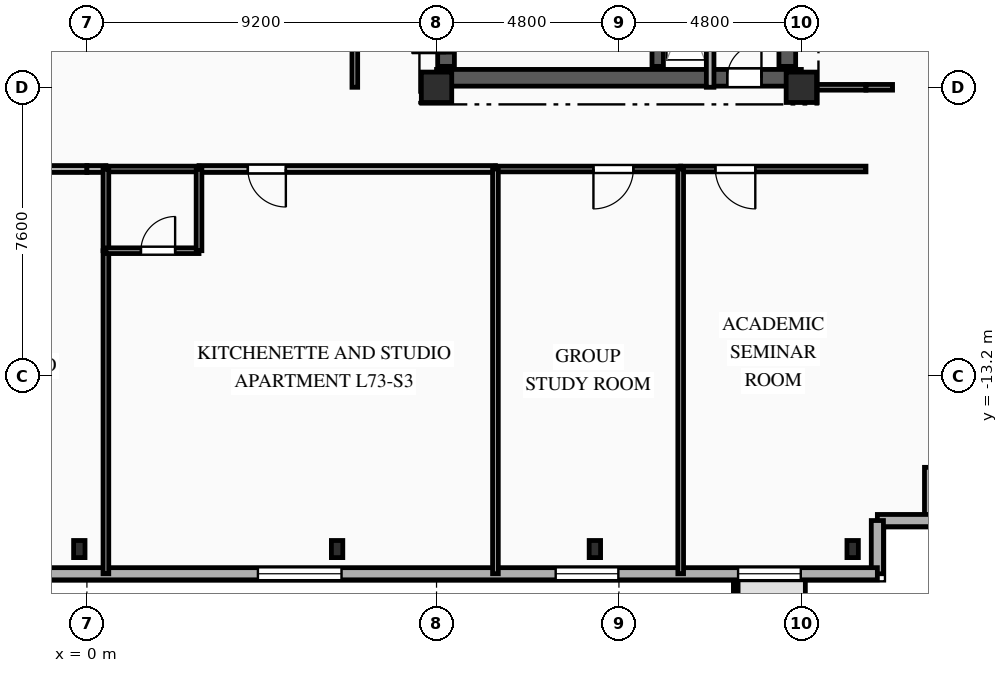
"""IFC4 building model, lengths in metres.
Left out: names, types, materials, properties, quantities, classifications, styles, units other than length and angle.
Written with IfcOpenShell. Run it as: python <this file> out.ifc"""

import sys

from ifc_helpers import new_model, si_unit, direction, frame, frame_2d, origin, origin_2d, place, context, subcontext, project, spatial, rectangle, i_section, extrude, element, fill, save


model = new_model("IFC4")
c1 = context("Model", 3, precision=1e-05, world=origin(), true_north=direction((0.0, 1.0)))
c2 = subcontext(c1, "Body", "Model", "MODEL_VIEW")
j1 = project(units=[si_unit("LENGTHUNIT", "METRE"), si_unit("PLANEANGLEUNIT", "RADIAN")], contexts=[c1])
p1 = place(None, origin())
s1 = spatial("IfcSite", under=j1, at=p1, CompositionType="ELEMENT")
p2 = place(p1, origin())
s2 = spatial("IfcBuilding", under=s1, at=p2, CompositionType="ELEMENT")
p3 = place(p2, frame((0.0, 0.0, 258.45)))
s3 = spatial("IfcBuildingStorey", under=s2, at=p3, CompositionType="ELEMENT", Elevation=258.45)
for number, where, z_axis, x_axis in (
    (1, (9.2, -5.6, 0.0), (0.0, 0.0, 1.0), (1.0, 0.0, 0.0)),
    (2, (18.8, -5.6, 0.0), (0.0, 0.0, 1.0), (1.0, 0.0, 0.0)),
):
    element("IfcColumn", number, at=place(p3, frame(where, z_axis=z_axis, x_axis=x_axis)), inside=s3, PredefinedType="COLUMN", context=c2, shape_type="SweptSolid", body=[
        extrude(rectangle(XDim=0.8, YDim=0.8, at=origin_2d()), origin(), (0.0, 0.0, 1.0), 3.35),
    ])
for number, where, z_axis, x_axis in (
    (3, (-0.2, -17.75, 0.0), (0.0, 0.0, 1.0), (1.0, 0.0, 0.0)),
    (4, (6.583, -17.75, 0.0), (0.0, 0.0, 1.0), (1.0, 0.0, 0.0)),
    (5, (13.367, -17.75, 0.0), (0.0, 0.0, 1.0), (1.0, 0.0, 0.0)),
    (6, (20.15, -17.75, 0.0), (0.0, 0.0, 1.0), (1.0, 0.0, 0.0)),
):
    element("IfcColumn", number, at=place(p3, frame(where, z_axis=z_axis, x_axis=x_axis)), inside=s3, PredefinedType="COLUMN", context=c2, shape_type="SweptSolid", body=[
        extrude(i_section(OverallWidth=0.3, OverallDepth=0.45, WebThickness=0.014, FlangeThickness=0.026, FilletRadius=0.027, at=origin_2d()), origin(), (0.0, 0.0, 1.0), 3.35),
    ])
for number, where, z_axis, x_axis in (
    (7, (22.2, -15.6, 0.0), (0.0, 0.0, 1.0), (0.0, -1.0, 0.0)),
    (8, (22.2, -17.0, 0.0), (0.0, 0.0, 1.0), (-1.0, 0.0, 0.0)),
    (9, (20.8, -17.0, 0.0), (0.0, 0.0, 1.0), (0.0, -1.0, 0.0)),
):
    element("IfcWall", number, at=place(p3, frame(where, z_axis=z_axis, x_axis=x_axis)), inside=s3, PredefinedType="SOLIDWALL", context=c2, shape_type="SweptSolid", body=[
        extrude(rectangle(XDim=1.4, YDim=0.32, at=frame_2d((0.7, 0.0))), origin(), (0.0, 0.0, 1.0), 3.03),
    ])
p4 = place(p3, frame((20.8, -18.4, 0.0), z_axis=(0.0, 0.0, 1.0), x_axis=(-1.0, 0.0, 0.0)))
e10 = element("IfcWall", 10, at=p4, inside=s3, PredefinedType="SOLIDWALL", context=c2, shape_type="SweptSolid", body=[
    extrude(rectangle(XDim=42.0, YDim=0.32, at=frame_2d((21.0, 0.0))), origin(), (0.0, 0.0, 1.0), 3.03),
])
p5 = place(p4, frame((2.015, 0.0, 0.85)))
e11 = element("IfcOpeningElement", 11, at=p5, cuts=e10, PredefinedType="OPENING", context=c2, shape_type="SweptSolid", body=[
    extrude(rectangle(XDim=1.65, YDim=1.85, at=frame_2d((0.825, 0.925))), frame((0.0, 0.17, 0.0), z_axis=(0.0, -1.0, 0.0), x_axis=(1.0, 0.0, 0.0)), (0.0, 0.0, 1.0), 0.34),
])
p6 = place(p4, frame((6.815, 0.0, 0.85)))
e12 = element("IfcOpeningElement", 12, at=p6, cuts=e10, PredefinedType="OPENING", context=c2, shape_type="SweptSolid", body=[
    extrude(rectangle(XDim=1.65, YDim=1.85, at=frame_2d((0.825, 0.925))), frame((0.0, 0.17, 0.0), z_axis=(0.0, -1.0, 0.0), x_axis=(1.0, 0.0, 0.0)), (0.0, 0.0, 1.0), 0.34),
])
p7 = place(p4, frame((14.1, 0.0, 0.85)))
e13 = element("IfcOpeningElement", 13, at=p7, cuts=e10, PredefinedType="OPENING", context=c2, shape_type="SweptSolid", body=[
    extrude(rectangle(XDim=2.2, YDim=1.85, at=frame_2d((1.1, 0.925))), frame((0.0, 0.17, 0.0), z_axis=(0.0, -1.0, 0.0), x_axis=(1.0, 0.0, 0.0)), (0.0, 0.0, 1.0), 0.34),
])
p8 = place(p4, frame((24.34, 0.0, 0.85)))
e14 = element("IfcOpeningElement", 14, at=p8, cuts=e10, PredefinedType="OPENING", context=c2, shape_type="SweptSolid", body=[
    extrude(rectangle(XDim=2.2, YDim=1.85, at=frame_2d((1.1, 0.925))), frame((0.0, 0.17, 0.0), z_axis=(0.0, -1.0, 0.0), x_axis=(1.0, 0.0, 0.0)), (0.0, 0.0, 1.0), 0.34),
])
p9 = place(p4, frame((32.455, 0.0, 0.85)))
e15 = element("IfcOpeningElement", 15, at=p9, cuts=e10, PredefinedType="OPENING", context=c2, shape_type="SweptSolid", body=[
    extrude(rectangle(XDim=1.65, YDim=1.85, at=frame_2d((0.825, 0.925))), frame((0.0, 0.17, 0.0), z_axis=(0.0, -1.0, 0.0), x_axis=(1.0, 0.0, 0.0)), (0.0, 0.0, 1.0), 0.34),
])
p10 = place(p4, frame((37.855, 0.0, 0.85)))
e16 = element("IfcOpeningElement", 16, at=p10, cuts=e10, PredefinedType="OPENING", context=c2, shape_type="SweptSolid", body=[
    extrude(rectangle(XDim=1.65, YDim=1.85, at=frame_2d((0.825, 0.925))), frame((0.0, 0.17, 0.0), z_axis=(0.0, -1.0, 0.0), x_axis=(1.0, 0.0, 0.0)), (0.0, 0.0, 1.0), 0.34),
])
p11 = place(p3, frame((9.2, -5.35, 0.0), z_axis=(0.0, 0.0, 1.0), x_axis=(1.0, 0.0, 0.0)))
e17 = element("IfcWall", 17, at=p11, inside=s3, PredefinedType="SHEAR", context=c2, shape_type="SweptSolid", body=[
    extrude(rectangle(XDim=9.6, YDim=0.44, at=frame_2d((4.8, 0.0))), origin(), (0.0, 0.0, 1.0), 3.03),
])
p12 = place(p11, frame((7.65, 0.0, 0.0)))
e18 = element("IfcOpeningElement", 18, at=p12, cuts=e17, PredefinedType="OPENING", context=c2, shape_type="SweptSolid", body=[
    extrude(rectangle(XDim=0.9, YDim=2.1, at=frame_2d((0.45, 1.05))), frame((0.0, 0.23, 0.0), z_axis=(0.0, -1.0, 0.0), x_axis=(1.0, 0.0, 0.0)), (0.0, 0.0, 1.0), 0.46),
])
p13 = place(p3, frame((9.45, -5.05, 0.0), z_axis=(0.0, 0.0, 1.0), x_axis=(0.0, 1.0, 0.0)))
e19 = element("IfcWall", 19, at=p13, inside=s3, PredefinedType="SHEAR", context=c2, shape_type="SweptSolid", body=[
    extrude(rectangle(XDim=10.1, YDim=0.44, at=frame_2d((5.05, 0.0))), origin(), (0.0, 0.0, 1.0), 3.03),
])
p14 = place(p13, frame((7.15, 0.0, 0.0)))
e20 = element("IfcOpeningElement", 20, at=p14, cuts=e19, PredefinedType="OPENING", context=c2, shape_type="SweptSolid", body=[
    extrude(rectangle(XDim=0.9, YDim=2.1, at=frame_2d((0.45, 1.05))), frame((0.0, 0.23, 0.0), z_axis=(0.0, -1.0, 0.0), x_axis=(1.0, 0.0, 0.0)), (0.0, 0.0, 1.0), 0.46),
])
p15 = place(p13, frame((2.4, 0.0, 0.0)))
e21 = element("IfcOpeningElement", 21, at=p15, cuts=e19, PredefinedType="OPENING", context=c2, shape_type="SweptSolid", body=[
    extrude(rectangle(XDim=1.2, YDim=2.15, at=frame_2d((0.6, 1.075))), frame((0.0, 0.23, 0.0), z_axis=(0.0, -1.0, 0.0), x_axis=(1.0, 0.0, 0.0)), (0.0, 0.0, 1.0), 0.46),
])
p16 = place(p13, frame((0.35, 0.0, 0.0)))
e22 = element("IfcOpeningElement", 22, at=p16, cuts=e19, PredefinedType="OPENING", context=c2, shape_type="SweptSolid", body=[
    extrude(rectangle(XDim=0.9, YDim=2.1, at=frame_2d((0.45, 1.05))), frame((0.0, 0.23, 0.0), z_axis=(0.0, -1.0, 0.0), x_axis=(1.0, 0.0, 0.0)), (0.0, 0.0, 1.0), 0.46),
])
p17 = place(p3, frame((18.43, -5.05, 0.0), z_axis=(0.0, 0.0, 1.0), x_axis=(0.0, 1.0, 0.0)))
e23 = element("IfcWall", 23, at=p17, inside=s3, PredefinedType="SHEAR", context=c2, shape_type="SweptSolid", body=[
    extrude(rectangle(XDim=10.1, YDim=0.44, at=frame_2d((5.05, 0.0))), origin(), (0.0, 0.0, 1.0), 3.03),
])
p18 = place(p3, frame((15.02, -5.05, 0.0), z_axis=(0.0, 0.0, 1.0), x_axis=(0.0, 1.0, 0.0)))
e24 = element("IfcWall", 24, at=p18, inside=s3, PredefinedType="SHEAR", context=c2, shape_type="SweptSolid", body=[
    extrude(rectangle(XDim=10.1, YDim=0.3, at=frame_2d((5.05, 0.0))), origin(), (0.0, 0.0, 1.0), 3.03),
])
p19 = place(p3, frame((16.4, -2.11, 0.0), z_axis=(0.0, 0.0, 1.0), x_axis=(0.0, -1.0, 0.0)))
e25 = element("IfcWall", 25, at=p19, inside=s3, PredefinedType="PARTITIONING", context=c2, shape_type="SweptSolid", body=[
    extrude(rectangle(XDim=3.49, YDim=0.2, at=frame_2d((1.745, 0.0))), origin(), (0.0, 0.0, 1.0), 3.03),
])
p20 = place(p3, frame((0.0, -7.75, 0.0), z_axis=(0.0, 0.0, 1.0), x_axis=(-1.0, 0.0, 0.0)))
e26 = element("IfcWall", 26, at=p20, inside=s3, PredefinedType="PARTITIONING", context=c2, shape_type="SweptSolid", body=[
    extrude(rectangle(XDim=7.3, YDim=0.18, at=frame_2d((3.65, 0.0))), origin(), (0.0, 0.0, 1.0), 3.03),
])
p21 = place(p20, frame((1.222, 0.0, 0.0)))
e27 = element("IfcOpeningElement", 27, at=p21, cuts=e26, PredefinedType="OPENING", context=c2, shape_type="SweptSolid", body=[
    extrude(rectangle(XDim=1.0, YDim=2.15, at=frame_2d((0.5, 1.075))), frame((0.0, 0.1, 0.0), z_axis=(0.0, -1.0, 0.0), x_axis=(1.0, 0.0, 0.0)), (0.0, 0.0, 1.0), 0.2),
])
p22 = place(p3, frame((18.8, -5.6, 0.0), z_axis=(0.0, 0.0, 1.0), x_axis=(1.0, 0.0, 0.0)))
e28 = element("IfcWall", 28, at=p22, inside=s3, PredefinedType="PARTITIONING", context=c2, shape_type="SweptSolid", body=[
    extrude(rectangle(XDim=1.7, YDim=0.15, at=frame_2d((0.85, 0.0))), origin(), (0.0, 0.0, 1.0), 3.03),
])
p23 = place(p3, frame((20.5, -5.6, 0.0), z_axis=(0.0, 0.0, 1.0), x_axis=(1.0, 0.0, 0.0)))
e29 = element("IfcWall", 29, at=p23, inside=s3, PredefinedType="PARTITIONING", context=c2, shape_type="SweptSolid", body=[
    extrude(rectangle(XDim=0.7, YDim=0.15, at=frame_2d((0.35, 0.0))), origin(), (0.0, 0.0, 1.0), 3.03),
])
p24 = place(p3, frame((0.5, -7.75, 0.0), z_axis=(0.0, 0.0, 1.0), x_axis=(-1.0, 0.0, 0.0)))
e30 = element("IfcWall", 30, at=p24, inside=s3, PredefinedType="PARTITIONING", context=c2, shape_type="SweptSolid", body=[
    extrude(rectangle(XDim=0.5, YDim=0.18, at=frame_2d((0.25, 0.0))), origin(), (0.0, 0.0, 1.0), 3.03),
])
p25 = place(p3, frame((10.75, -7.75, 0.0), z_axis=(0.0, 0.0, 1.0), x_axis=(-1.0, 0.0, 0.0)))
e31 = element("IfcWall", 31, at=p25, inside=s3, PredefinedType="PARTITIONING", context=c2, shape_type="SweptSolid", body=[
    extrude(rectangle(XDim=7.8, YDim=0.18, at=frame_2d((3.9, 0.0))), origin(), (0.0, 0.0, 1.0), 3.03),
])
p26 = place(p25, frame((5.515, 0.0, 0.0)))
e32 = element("IfcOpeningElement", 32, at=p26, cuts=e31, PredefinedType="OPENING", context=c2, shape_type="SweptSolid", body=[
    extrude(rectangle(XDim=1.0, YDim=2.15, at=frame_2d((0.5, 1.075))), frame((0.0, 0.1, 0.0), z_axis=(0.0, -1.0, 0.0), x_axis=(1.0, 0.0, 0.0)), (0.0, 0.0, 1.0), 0.2),
])
p27 = place(p3, frame((2.95, -7.75, 0.0), z_axis=(0.0, 0.0, 1.0), x_axis=(-1.0, 0.0, 0.0)))
e33 = element("IfcWall", 33, at=p27, inside=s3, PredefinedType="PLUMBINGWALL", context=c2, shape_type="SweptSolid", body=[
    extrude(rectangle(XDim=2.45, YDim=0.15, at=frame_2d((1.225, 0.0))), origin(), (0.0, 0.0, 1.0), 3.03),
])
p28 = place(p3, frame((15.625, -7.75, 0.0), z_axis=(0.0, 0.0, 1.0), x_axis=(-1.0, 0.0, 0.0)))
e34 = element("IfcWall", 34, at=p28, inside=s3, PredefinedType="PARTITIONING", context=c2, shape_type="SweptSolid", body=[
    extrude(rectangle(XDim=4.875, YDim=0.15, at=frame_2d((2.438, 0.0))), origin(), (0.0, 0.0, 1.0), 3.03),
])
p29 = place(p28, frame((1.246, 0.0, 0.0)))
e35 = element("IfcOpeningElement", 35, at=p29, cuts=e34, PredefinedType="OPENING", context=c2, shape_type="SweptSolid", body=[
    extrude(rectangle(XDim=1.05, YDim=2.15, at=frame_2d((0.525, 1.075))), frame((0.0, 0.085, 0.0), z_axis=(0.0, -1.0, 0.0), x_axis=(1.0, 0.0, 0.0)), (0.0, 0.0, 1.0), 0.17),
])
p30 = place(p3, frame((20.5, -7.75, 0.0), z_axis=(0.0, 0.0, 1.0), x_axis=(-1.0, 0.0, 0.0)))
e36 = element("IfcWall", 36, at=p30, inside=s3, PredefinedType="PARTITIONING", context=c2, shape_type="SweptSolid", body=[
    extrude(rectangle(XDim=4.875, YDim=0.15, at=frame_2d((2.438, 0.0))), origin(), (0.0, 0.0, 1.0), 3.03),
])
p31 = place(p30, frame((2.912, 0.0, 0.0)))
e37 = element("IfcOpeningElement", 37, at=p31, cuts=e36, PredefinedType="OPENING", context=c2, shape_type="SweptSolid", body=[
    extrude(rectangle(XDim=1.05, YDim=2.15, at=frame_2d((0.525, 1.075))), frame((0.0, 0.085, 0.0), z_axis=(0.0, -1.0, 0.0), x_axis=(1.0, 0.0, 0.0)), (0.0, 0.0, 1.0), 0.17),
])
p32 = place(p3, frame((7.05, -5.6, 0.0), z_axis=(0.0, 0.0, 1.0), x_axis=(0.0, 1.0, 0.0)))
e38 = element("IfcWall", 38, at=p32, inside=s3, PredefinedType="PARTITIONING", context=c2, shape_type="SweptSolid", body=[
    extrude(rectangle(XDim=7.05, YDim=0.15, at=frame_2d((3.525, 0.0))), origin(), (0.0, 0.0, 1.0), 3.03),
])
p33 = place(p3, frame((0.5, -9.9, 0.0), z_axis=(0.0, 0.0, 1.0), x_axis=(0.0, -1.0, 0.0)))
e39 = element("IfcWall", 39, at=p33, inside=s3, PredefinedType="PARTITIONING", context=c2, shape_type="SweptSolid", body=[
    extrude(rectangle(XDim=8.5, YDim=0.15, at=frame_2d((4.25, 0.0))), origin(), (0.0, 0.0, 1.0), 3.03),
])
p34 = place(p3, frame((0.5, -7.75, 0.0), z_axis=(0.0, 0.0, 1.0), x_axis=(0.0, -1.0, 0.0)))
e40 = element("IfcWall", 40, at=p34, inside=s3, PredefinedType="PLUMBINGWALL", context=c2, shape_type="SweptSolid", body=[
    extrude(rectangle(XDim=2.15, YDim=0.15, at=frame_2d((1.075, 0.0))), origin(), (0.0, 0.0, 1.0), 3.03),
])
p35 = place(p3, frame((0.5, -9.9, 0.0), z_axis=(0.0, 0.0, 1.0), x_axis=(1.0, 0.0, 0.0)))
e41 = element("IfcWall", 41, at=p35, inside=s3, PredefinedType="PLUMBINGWALL", context=c2, shape_type="SweptSolid", body=[
    extrude(rectangle(XDim=2.45, YDim=0.15, at=frame_2d((1.225, 0.0))), origin(), (0.0, 0.0, 1.0), 3.03),
])
p36 = place(p35, frame((0.921, 0.0, 0.0)))
e42 = element("IfcOpeningElement", 42, at=p36, cuts=e41, PredefinedType="OPENING", context=c2, shape_type="SweptSolid", body=[
    extrude(rectangle(XDim=0.9, YDim=2.1, at=frame_2d((0.45, 1.05))), frame((0.0, 0.085, 0.0), z_axis=(0.0, -1.0, 0.0), x_axis=(1.0, 0.0, 0.0)), (0.0, 0.0, 1.0), 0.17),
])
p37 = place(p3, frame((2.95, -9.9, 0.0), z_axis=(0.0, 0.0, 1.0), x_axis=(0.0, 1.0, 0.0)))
e43 = element("IfcWall", 43, at=p37, inside=s3, PredefinedType="PLUMBINGWALL", context=c2, shape_type="SweptSolid", body=[
    extrude(rectangle(XDim=2.15, YDim=0.15, at=frame_2d((1.075, 0.0))), origin(), (0.0, 0.0, 1.0), 3.03),
])
for number, where, z_axis, x_axis in (
    (44, (10.75, -7.75, 0.0), (0.0, 0.0, 1.0), (0.0, -1.0, 0.0)),
    (45, (15.625, -7.75, 0.0), (0.0, 0.0, 1.0), (0.0, -1.0, 0.0)),
):
    element("IfcWall", number, at=place(p3, frame(where, z_axis=z_axis, x_axis=x_axis)), inside=s3, PredefinedType="PARTITIONING", context=c2, shape_type="SweptSolid", body=[
        extrude(rectangle(XDim=10.65, YDim=0.15, at=frame_2d((5.325, 0.0))), origin(), (0.0, 0.0, 1.0), 3.03),
    ])
p38 = place(p5, origin())
e46 = element("IfcWindow", 46, at=p38, inside=s3, PartitioningType="SINGLE_PANEL", PredefinedType="WINDOW", context=c2, shape_type="SweptSolid", body=[
    extrude(rectangle(XDim=1.65, YDim=1.85, at=frame_2d((0.825, 0.925))), frame((0.0, 0.03, 0.0), z_axis=(0.0, -1.0, 0.0), x_axis=(1.0, 0.0, 0.0)), (0.0, 0.0, 1.0), 0.06),
])
fill(e11, e46)
p39 = place(p6, origin())
e47 = element("IfcWindow", 47, at=p39, inside=s3, PartitioningType="SINGLE_PANEL", PredefinedType="WINDOW", context=c2, shape_type="SweptSolid", body=[
    extrude(rectangle(XDim=1.65, YDim=1.85, at=frame_2d((0.825, 0.925))), frame((0.0, 0.03, 0.0), z_axis=(0.0, -1.0, 0.0), x_axis=(1.0, 0.0, 0.0)), (0.0, 0.0, 1.0), 0.06),
])
fill(e12, e47)
p40 = place(p7, origin())
e48 = element("IfcWindow", 48, at=p40, inside=s3, PartitioningType="SINGLE_PANEL", PredefinedType="WINDOW", context=c2, shape_type="SweptSolid", body=[
    extrude(rectangle(XDim=2.2, YDim=1.85, at=frame_2d((1.1, 0.925))), frame((0.0, 0.03, 0.0), z_axis=(0.0, -1.0, 0.0), x_axis=(1.0, 0.0, 0.0)), (0.0, 0.0, 1.0), 0.06),
])
fill(e13, e48)
p41 = place(p12, origin())
e49 = element("IfcDoor", 49, at=p41, inside=s3, OperationType="SINGLE_SWING_RIGHT", PredefinedType="DOOR", context=c2, shape_type="SweptSolid", body=[
    extrude(rectangle(XDim=0.9, YDim=2.1, at=frame_2d((0.45, 1.05))), frame((0.0, 0.025, 0.0), z_axis=(0.0, -1.0, 0.0), x_axis=(1.0, 0.0, 0.0)), (0.0, 0.0, 1.0), 0.05),
])
fill(e18, e49)
p42 = place(p16, origin())
e50 = element("IfcDoor", 50, at=p42, inside=s3, OperationType="SINGLE_SWING_LEFT", PredefinedType="DOOR", context=c2, shape_type="SweptSolid", body=[
    extrude(rectangle(XDim=0.9, YDim=2.1, at=frame_2d((0.45, 1.05))), frame((0.0, 0.025, 0.0), z_axis=(0.0, -1.0, 0.0), x_axis=(1.0, 0.0, 0.0)), (0.0, 0.0, 1.0), 0.05),
])
fill(e22, e50)
p43 = place(p26, origin())
e51 = element("IfcDoor", 51, at=p43, inside=s3, OperationType="SINGLE_SWING_LEFT", PredefinedType="DOOR", context=c2, shape_type="SweptSolid", body=[
    extrude(rectangle(XDim=1.0, YDim=2.15, at=frame_2d((0.5, 1.075))), frame((0.0, 0.025, 0.0), z_axis=(0.0, -1.0, 0.0), x_axis=(1.0, 0.0, 0.0)), (0.0, 0.0, 1.0), 0.05),
])
fill(e32, e51)
p44 = place(p29, origin())
e52 = element("IfcDoor", 52, at=p44, inside=s3, OperationType="SINGLE_SWING_RIGHT", PredefinedType="DOOR", context=c2, shape_type="SweptSolid", body=[
    extrude(rectangle(XDim=1.05, YDim=2.15, at=frame_2d((0.525, 1.075))), frame((0.0, 0.025, 0.0), z_axis=(0.0, -1.0, 0.0), x_axis=(1.0, 0.0, 0.0)), (0.0, 0.0, 1.0), 0.05),
])
fill(e35, e52)
p45 = place(p31, origin())
e53 = element("IfcDoor", 53, at=p45, inside=s3, OperationType="SINGLE_SWING_LEFT", PredefinedType="DOOR", context=c2, shape_type="SweptSolid", body=[
    extrude(rectangle(XDim=1.05, YDim=2.15, at=frame_2d((0.525, 1.075))), frame((0.0, 0.025, 0.0), z_axis=(0.0, -1.0, 0.0), x_axis=(1.0, 0.0, 0.0)), (0.0, 0.0, 1.0), 0.05),
])
fill(e37, e53)
p46 = place(p36, origin())
e54 = element("IfcDoor", 54, at=p46, inside=s3, OperationType="SINGLE_SWING_RIGHT", PredefinedType="DOOR", context=c2, shape_type="SweptSolid", body=[
    extrude(rectangle(XDim=0.9, YDim=2.1, at=frame_2d((0.45, 1.05))), frame((0.0, 0.025, 0.0), z_axis=(0.0, -1.0, 0.0), x_axis=(1.0, 0.0, 0.0)), (0.0, 0.0, 1.0), 0.05),
])
fill(e42, e54)
save(model, sys.argv[1])
